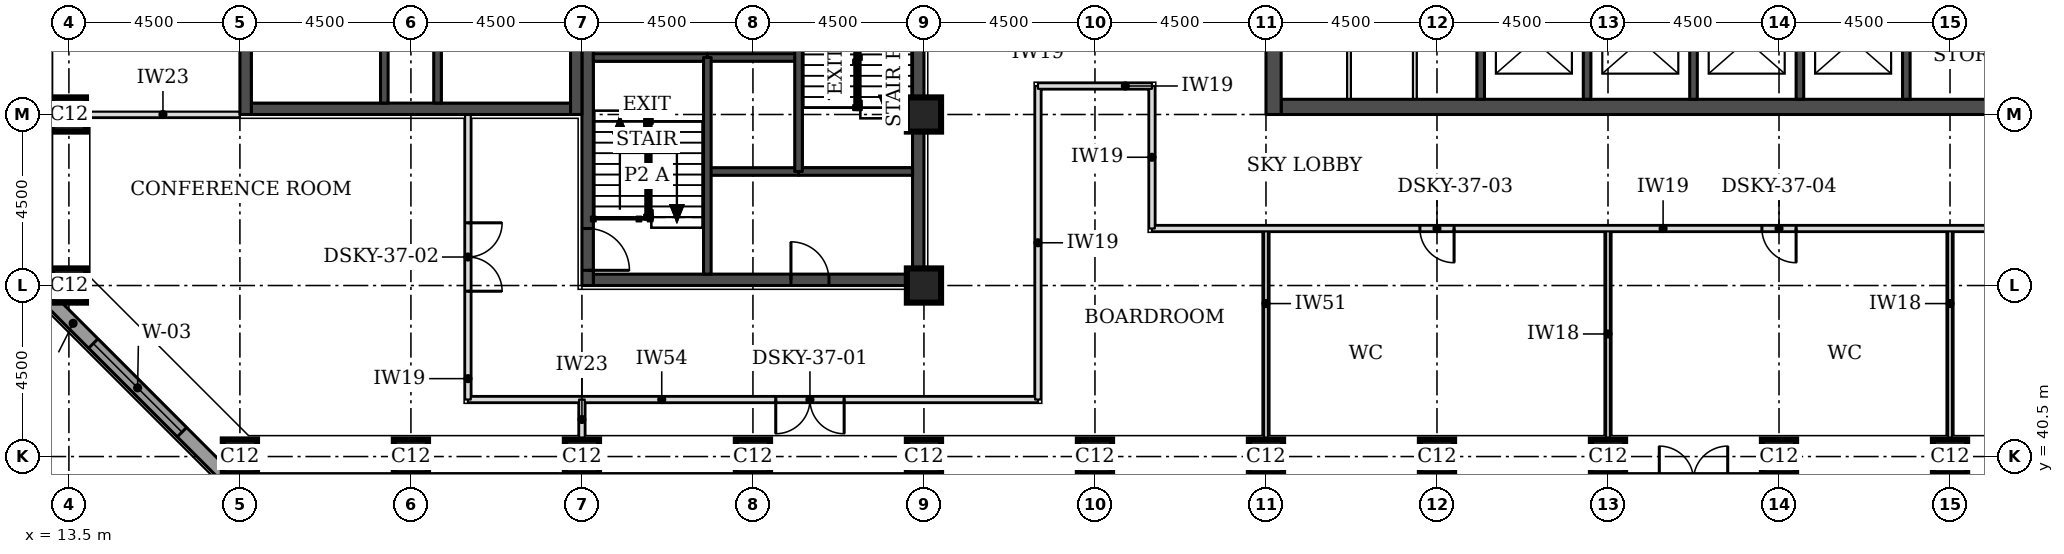
"""IFC4 building model, lengths in metres.
Left out: names, types, materials, properties, quantities, classifications, styles, units other than length and angle.
Written with IfcOpenShell. Run it as: python <this file> out.ifc"""

import sys

from ifc_helpers import new_model, si_unit, direction, frame, frame_2d, origin, origin_2d, place, context, subcontext, project, spatial, rectangle, extrude, element, fill, save


model = new_model("IFC4")
c1 = context("Model", 3, precision=1e-05, world=origin(), true_north=direction((0.0, 1.0)))
c2 = subcontext(c1, "Body", "Model", "MODEL_VIEW")
j1 = project(units=[si_unit("LENGTHUNIT", "METRE"), si_unit("PLANEANGLEUNIT", "RADIAN")], contexts=[c1])
p1 = place(None, origin())
s1 = spatial("IfcSite", under=j1, at=p1, CompositionType="ELEMENT")
p2 = place(p1, origin())
s2 = spatial("IfcBuilding", under=s1, at=p2, CompositionType="ELEMENT")
p3 = place(p2, frame((0.0, 0.0, 143.1)))
s3 = spatial("IfcBuildingStorey", under=s2, at=p3, CompositionType="ELEMENT", Elevation=143.1)
for number, where, z_axis, x_axis in (
    (1, (18.0, 40.5, 0.0), (0.0, 0.0, 1.0), (1.0, 0.0, 0.0)),
    (2, (22.5, 40.5, 0.0), (0.0, 0.0, 1.0), (1.0, 0.0, 0.0)),
    (3, (27.0, 40.5, 0.0), (0.0, 0.0, 1.0), (1.0, 0.0, 0.0)),
    (4, (31.5, 40.5, 0.0), (0.0, 0.0, 1.0), (1.0, 0.0, 0.0)),
    (5, (36.0, 40.5, 0.0), (0.0, 0.0, 1.0), (1.0, 0.0, 0.0)),
    (6, (40.5, 40.5, 0.0), (0.0, 0.0, 1.0), (1.0, 0.0, 0.0)),
    (7, (45.0, 40.5, 0.0), (0.0, 0.0, 1.0), (1.0, 0.0, 0.0)),
    (8, (49.5, 40.5, 0.0), (0.0, 0.0, 1.0), (1.0, 0.0, 0.0)),
    (9, (54.0, 40.5, 0.0), (0.0, 0.0, 1.0), (1.0, 0.0, 0.0)),
    (10, (58.5, 40.5, 0.0), (0.0, 0.0, 1.0), (1.0, 0.0, 0.0)),
    (11, (63.0, 40.5, 0.0), (0.0, 0.0, 1.0), (1.0, 0.0, 0.0)),
    (12, (13.5, 45.0, 0.0), (0.0, 0.0, 1.0), (1.0, 0.0, 0.0)),
    (13, (36.0, 45.0, 0.0), (0.0, 0.0, 1.0), (1.0, 0.0, 0.0)),
    (14, (13.5, 49.5, 0.0), (0.0, 0.0, 1.0), (1.0, 0.0, 0.0)),
    (15, (36.0, 49.5, 0.0), (0.0, 0.0, 1.0), (1.0, 0.0, 0.0)),
):
    element("IfcColumn", number, at=place(p3, frame(where, z_axis=z_axis, x_axis=x_axis)), inside=s3, PredefinedType="COLUMN", context=c2, shape_type="SweptSolid", body=[
        extrude(rectangle(XDim=0.9, YDim=0.9, at=origin_2d()), origin(), (0.0, 0.0, 1.0), 4.6),
    ])
p4 = place(p3, frame((45.4, 49.7, 0.0), z_axis=(0.0, 0.0, 1.0), x_axis=(1.0, 0.0, 0.0)))
e16 = element("IfcWall", 16, at=p4, inside=s3, PredefinedType="SHEAR", context=c2, shape_type="SweptSolid", body=[
    extrude(rectangle(XDim=21.7, YDim=0.4, at=frame_2d((10.85, 0.0))), origin(), (0.0, 0.0, 1.0), 4.6),
])
p5 = place(p3, frame((45.2, 49.5, 0.0), z_axis=(0.0, 0.0, 1.0), x_axis=(0.0, 1.0, 0.0)))
e17 = element("IfcWall", 17, at=p5, inside=s3, PredefinedType="SHEAR", context=c2, shape_type="SweptSolid", body=[
    extrude(rectangle(XDim=22.5, YDim=0.4, at=frame_2d((11.25, 0.0))), origin(), (0.0, 0.0, 1.0), 4.6),
])
p6 = place(p5, frame((4.2, 0.0, 0.0)))
e18 = element("IfcOpeningElement", 18, at=p6, cuts=e17, PredefinedType="OPENING", context=c2, shape_type="SweptSolid", body=[
    extrude(rectangle(XDim=1.8, YDim=2.1, at=frame_2d((0.9, 1.05))), frame((0.0, 0.21, 0.0), z_axis=(0.0, -1.0, 0.0), x_axis=(1.0, 0.0, 0.0)), (0.0, 0.0, 1.0), 0.42),
])
p7 = place(p5, frame((6.9, 0.0, 0.0)))
e19 = element("IfcOpeningElement", 19, at=p7, cuts=e17, PredefinedType="OPENING", context=c2, shape_type="SweptSolid", body=[
    extrude(rectangle(XDim=1.1, YDim=2.1, at=frame_2d((0.55, 1.05))), frame((0.0, 0.21, 0.0), z_axis=(0.0, -1.0, 0.0), x_axis=(1.0, 0.0, 0.0)), (0.0, 0.0, 1.0), 0.42),
])
p8 = place(p5, frame((13.6, 0.0, 0.0)))
e20 = element("IfcOpeningElement", 20, at=p8, cuts=e17, PredefinedType="OPENING", context=c2, shape_type="SweptSolid", body=[
    extrude(rectangle(XDim=1.1, YDim=2.1, at=frame_2d((0.55, 1.05))), frame((0.0, 0.21, 0.0), z_axis=(0.0, -1.0, 0.0), x_axis=(1.0, 0.0, 0.0)), (0.0, 0.0, 1.0), 0.42),
])
p9 = place(p5, frame((16.5, 0.0, 0.0)))
e21 = element("IfcOpeningElement", 21, at=p9, cuts=e17, PredefinedType="OPENING", context=c2, shape_type="SweptSolid", body=[
    extrude(rectangle(XDim=1.8, YDim=2.1, at=frame_2d((0.9, 1.05))), frame((0.0, 0.21, 0.0), z_axis=(0.0, -1.0, 0.0), x_axis=(1.0, 0.0, 0.0)), (0.0, 0.0, 1.0), 0.42),
])
p10 = place(p3, frame((27.3, 45.15, 0.0), z_axis=(0.0, 0.0, 1.0), x_axis=(1.0, 0.0, 0.0)))
e22 = element("IfcWall", 22, at=p10, inside=s3, PredefinedType="SHEAR", context=c2, shape_type="SweptSolid", body=[
    extrude(rectangle(XDim=8.4, YDim=0.3, at=frame_2d((4.2, 0.0))), origin(), (0.0, 0.0, 1.0), 4.6),
])
p11 = place(p10, frame((5.2, 0.0, 0.0)))
e23 = element("IfcOpeningElement", 23, at=p11, cuts=e22, PredefinedType="OPENING", context=c2, shape_type="SweptSolid", body=[
    extrude(rectangle(XDim=1.0, YDim=2.1, at=frame_2d((0.5, 1.05))), frame((0.0, 0.16, 0.0), z_axis=(0.0, -1.0, 0.0), x_axis=(1.0, 0.0, 0.0)), (0.0, 0.0, 1.0), 0.32),
])
p12 = place(p3, frame((27.15, 45.0, 0.0), z_axis=(0.0, 0.0, 1.0), x_axis=(0.0, 1.0, 0.0)))
e24 = element("IfcWall", 24, at=p12, inside=s3, PredefinedType="SHEAR", context=c2, shape_type="SweptSolid", body=[
    extrude(rectangle(XDim=9.0, YDim=0.3, at=frame_2d((4.5, 0.0))), origin(), (0.0, 0.0, 1.0), 4.6),
])
p13 = place(p12, frame((0.4, 0.0, 0.0)))
e25 = element("IfcOpeningElement", 25, at=p13, cuts=e24, PredefinedType="OPENING", context=c2, shape_type="SweptSolid", body=[
    extrude(rectangle(XDim=1.1, YDim=2.1, at=frame_2d((0.55, 1.05))), frame((0.0, 0.16, 0.0), z_axis=(0.0, -1.0, 0.0), x_axis=(1.0, 0.0, 0.0)), (0.0, 0.0, 1.0), 0.32),
])
p14 = place(p3, frame((35.85, 45.0, 0.0), z_axis=(0.0, 0.0, 1.0), x_axis=(0.0, 1.0, 0.0)))
e26 = element("IfcWall", 26, at=p14, inside=s3, PredefinedType="SHEAR", context=c2, shape_type="SweptSolid", body=[
    extrude(rectangle(XDim=9.0, YDim=0.3, at=frame_2d((4.5, 0.0))), origin(), (0.0, 0.0, 1.0), 4.6),
])
p15 = place(p3, frame((18.3, 49.65, 0.0), z_axis=(0.0, 0.0, 1.0), x_axis=(1.0, 0.0, 0.0)))
e27 = element("IfcWall", 27, at=p15, inside=s3, PredefinedType="SHEAR", context=c2, shape_type="SweptSolid", body=[
    extrude(rectangle(XDim=8.4, YDim=0.3, at=frame_2d((4.2, 0.0))), origin(), (0.0, 0.0, 1.0), 4.6),
])
p16 = place(p3, frame((18.15, 49.5, 0.0), z_axis=(0.0, 0.0, 1.0), x_axis=(0.0, 1.0, 0.0)))
e28 = element("IfcWall", 28, at=p16, inside=s3, PredefinedType="SHEAR", context=c2, shape_type="SweptSolid", body=[
    extrude(rectangle(XDim=9.0, YDim=0.3, at=frame_2d((4.5, 0.0))), origin(), (0.0, 0.0, 1.0), 4.6),
])
p17 = place(p3, frame((26.85, 49.5, 0.0), z_axis=(0.0, 0.0, 1.0), x_axis=(0.0, 1.0, 0.0)))
e29 = element("IfcWall", 29, at=p17, inside=s3, PredefinedType="SHEAR", context=c2, shape_type="SweptSolid", body=[
    extrude(rectangle(XDim=9.0, YDim=0.3, at=frame_2d((4.5, 0.0))), origin(), (0.0, 0.0, 1.0), 4.6),
])
p18 = place(p17, frame((6.6, 0.0, 0.0)))
e30 = element("IfcOpeningElement", 30, at=p18, cuts=e29, PredefinedType="OPENING", context=c2, shape_type="SweptSolid", body=[
    extrude(rectangle(XDim=1.8, YDim=2.1, at=frame_2d((0.9, 1.05))), frame((0.0, 0.16, 0.0), z_axis=(0.0, -1.0, 0.0), x_axis=(1.0, 0.0, 0.0)), (0.0, 0.0, 1.0), 0.32),
])
p19 = place(p3, frame((12.824, 44.792, 0.0), z_axis=(0.0, 0.0, 1.0), x_axis=(0.707106781187, -0.707106781187, 0.0)))
e31 = element("IfcWall", 31, at=p19, inside=s3, PredefinedType="STANDARD", context=c2, shape_type="SweptSolid", body=[
    extrude(rectangle(XDim=7.027, YDim=0.35, at=frame_2d((3.513, 0.0))), origin(), (0.0, 0.0, 1.0), 4.425),
])
p20 = place(p19, frame((1.863, 0.0, 0.9)))
e32 = element("IfcOpeningElement", 32, at=p20, cuts=e31, PredefinedType="OPENING", context=c2, shape_type="SweptSolid", body=[
    extrude(rectangle(XDim=3.3, YDim=2.7, at=frame_2d((1.65, 1.35))), frame((0.0, 0.185, 0.0), z_axis=(0.0, -1.0, 0.0), x_axis=(1.0, 0.0, 0.0)), (0.0, 0.0, 1.0), 0.37),
])
p21 = place(p3, frame((45.0, 40.95, 0.0), z_axis=(0.0, 0.0, 1.0), x_axis=(0.0, 1.0, 0.0)))
e33 = element("IfcWall", 33, at=p21, inside=s3, PredefinedType="PARTITIONING", context=c2, shape_type="SweptSolid", body=[
    extrude(rectangle(XDim=5.55, YDim=0.1, at=frame_2d((2.775, 0.0))), origin(), (0.0, 0.0, 1.0), 3.922),
])
for number, where, z_axis, x_axis in (
    (34, (54.0, 40.95, 0.0), (0.0, 0.0, 1.0), (0.0, 1.0, 0.0)),
    (35, (63.0, 40.95, 0.0), (0.0, 0.0, 1.0), (0.0, 1.0, 0.0)),
):
    element("IfcWall", number, at=place(p3, frame(where, z_axis=z_axis, x_axis=x_axis)), inside=s3, PredefinedType="PARTITIONING", context=c2, shape_type="SweptSolid", body=[
        extrude(rectangle(XDim=5.55, YDim=0.1, at=frame_2d((2.775, 0.0))), origin(), (0.0, 0.0, 1.0), 4.45),
    ])
p22 = place(p3, frame((24.0, 42.0, 0.0), z_axis=(0.0, 0.0, 1.0), x_axis=(1.0, 0.0, 0.0)))
e36 = element("IfcWall", 36, at=p22, inside=s3, PredefinedType="PARTITIONING", context=c2, shape_type="SweptSolid", body=[
    extrude(rectangle(XDim=15.0, YDim=0.15, at=frame_2d((7.5, 0.0))), origin(), (0.0, 0.0, 1.0), 3.996),
])
p23 = place(p22, frame((8.1, 0.0, 0.0)))
e37 = element("IfcOpeningElement", 37, at=p23, cuts=e36, PredefinedType="OPENING", context=c2, shape_type="SweptSolid", body=[
    extrude(rectangle(XDim=1.8, YDim=2.1, at=frame_2d((0.9, 1.05))), frame((0.0, 0.085, 0.0), z_axis=(0.0, -1.0, 0.0), x_axis=(1.0, 0.0, 0.0)), (0.0, 0.0, 1.0), 0.17),
])
p24 = place(p3, frame((24.0, 42.0, 0.0), z_axis=(0.0, 0.0, 1.0), x_axis=(0.0, 1.0, 0.0)))
e38 = element("IfcWall", 38, at=p24, inside=s3, PredefinedType="PARTITIONING", context=c2, shape_type="SweptSolid", body=[
    extrude(rectangle(XDim=7.5, YDim=0.15, at=frame_2d((3.75, 0.0))), origin(), (0.0, 0.0, 1.0), 4.45),
])
p25 = place(p24, frame((2.85, 0.0, 0.0)))
e39 = element("IfcOpeningElement", 39, at=p25, cuts=e38, PredefinedType="OPENING", context=c2, shape_type="SweptSolid", body=[
    extrude(rectangle(XDim=1.8, YDim=2.1, at=frame_2d((0.9, 1.05))), frame((0.0, 0.085, 0.0), z_axis=(0.0, -1.0, 0.0), x_axis=(1.0, 0.0, 0.0)), (0.0, 0.0, 1.0), 0.17),
])
p26 = place(p3, frame((39.0, 42.0, 0.0), z_axis=(0.0, 0.0, 1.0), x_axis=(0.0, 1.0, 0.0)))
e40 = element("IfcWall", 40, at=p26, inside=s3, PredefinedType="PARTITIONING", context=c2, shape_type="SweptSolid", body=[
    extrude(rectangle(XDim=8.25, YDim=0.15, at=frame_2d((4.125, 0.0))), origin(), (0.0, 0.0, 1.0), 4.45),
])
p27 = place(p3, frame((42.0, 46.5, 0.0), z_axis=(0.0, 0.0, 1.0), x_axis=(1.0, 0.0, 0.0)))
e41 = element("IfcWall", 41, at=p27, inside=s3, PredefinedType="PARTITIONING", context=c2, shape_type="SweptSolid", body=[
    extrude(rectangle(XDim=28.5, YDim=0.15, at=frame_2d((14.25, 0.0))), origin(), (0.0, 0.0, 1.0), 4.45),
])
p28 = place(p27, frame((7.05, 0.0, 0.0)))
e42 = element("IfcOpeningElement", 42, at=p28, cuts=e41, PredefinedType="OPENING", context=c2, shape_type="SweptSolid", body=[
    extrude(rectangle(XDim=0.9, YDim=2.1, at=frame_2d((0.45, 1.05))), frame((0.0, 0.085, 0.0), z_axis=(0.0, -1.0, 0.0), x_axis=(1.0, 0.0, 0.0)), (0.0, 0.0, 1.0), 0.17),
])
p29 = place(p27, frame((16.05, 0.0, 0.0)))
e43 = element("IfcOpeningElement", 43, at=p29, cuts=e41, PredefinedType="OPENING", context=c2, shape_type="SweptSolid", body=[
    extrude(rectangle(XDim=0.9, YDim=2.1, at=frame_2d((0.45, 1.05))), frame((0.0, 0.085, 0.0), z_axis=(0.0, -1.0, 0.0), x_axis=(1.0, 0.0, 0.0)), (0.0, 0.0, 1.0), 0.17),
])
p30 = place(p27, frame((23.85, 0.0, 0.0)))
e44 = element("IfcOpeningElement", 44, at=p30, cuts=e41, PredefinedType="OPENING", context=c2, shape_type="SweptSolid", body=[
    extrude(rectangle(XDim=1.8, YDim=2.1, at=frame_2d((0.9, 1.05))), frame((0.0, 0.085, 0.0), z_axis=(0.0, -1.0, 0.0), x_axis=(1.0, 0.0, 0.0)), (0.0, 0.0, 1.0), 0.17),
])
p31 = place(p3, frame((42.0, 46.5, 0.0), z_axis=(0.0, 0.0, 1.0), x_axis=(0.0, 1.0, 0.0)))
e45 = element("IfcWall", 45, at=p31, inside=s3, PredefinedType="PARTITIONING", context=c2, shape_type="SweptSolid", body=[
    extrude(rectangle(XDim=3.75, YDim=0.15, at=frame_2d((1.875, 0.0))), origin(), (0.0, 0.0, 1.0), 4.45),
])
p32 = place(p3, frame((39.0, 50.25, 0.0), z_axis=(0.0, 0.0, 1.0), x_axis=(1.0, 0.0, 0.0)))
e46 = element("IfcWall", 46, at=p32, inside=s3, PredefinedType="PARTITIONING", context=c2, shape_type="SweptSolid", body=[
    extrude(rectangle(XDim=3.0, YDim=0.15, at=frame_2d((1.5, 0.0))), origin(), (0.0, 0.0, 1.0), 4.45),
])
p33 = place(p3, frame((27.0, 40.95, 0.0), z_axis=(0.0, 0.0, 1.0), x_axis=(0.0, 1.0, 0.0)))
e47 = element("IfcWall", 47, at=p33, inside=s3, PredefinedType="PARTITIONING", context=c2, shape_type="SweptSolid", body=[
    extrude(rectangle(XDim=1.05, YDim=0.15, at=frame_2d((0.525, 0.0))), origin(), (0.0, 0.0, 1.0), 4.45),
])
p34 = place(p3, frame((13.95, 49.5, 0.0), z_axis=(0.0, 0.0, 1.0), x_axis=(1.0, 0.0, 0.0)))
e48 = element("IfcWall", 48, at=p34, inside=s3, PredefinedType="PARTITIONING", context=c2, shape_type="SweptSolid", body=[
    extrude(rectangle(XDim=4.05, YDim=0.15, at=frame_2d((2.025, 0.0))), origin(), (0.0, 0.0, 1.0), 4.45),
])
for number, where, z_axis, x_axis in (
    (49, (47.185, 49.9, 0.0), (0.0, 0.0, 1.0), (0.0, 1.0, 0.0)),
    (50, (48.917, 49.9, 0.0), (0.0, 0.0, 1.0), (0.0, 1.0, 0.0)),
):
    element("IfcWall", number, at=place(p3, frame(where, z_axis=z_axis, x_axis=x_axis)), inside=s3, PredefinedType="PARTITIONING", context=c2, shape_type="SweptSolid", body=[
        extrude(rectangle(XDim=3.1, YDim=0.1, at=frame_2d((1.55, 0.0))), origin(), (0.0, 0.0, 1.0), 4.45),
    ])
for number, where, z_axis, x_axis in (
    (51, (50.65, 49.9, 0.0), (0.0, 0.0, 1.0), (0.0, 1.0, 0.0)),
    (52, (53.45, 49.9, 0.0), (0.0, 0.0, 1.0), (0.0, 1.0, 0.0)),
    (53, (56.25, 49.9, 0.0), (0.0, 0.0, 1.0), (0.0, 1.0, 0.0)),
    (54, (59.05, 49.9, 0.0), (0.0, 0.0, 1.0), (0.0, 1.0, 0.0)),
    (55, (61.85, 49.9, 0.0), (0.0, 0.0, 1.0), (0.0, 1.0, 0.0)),
):
    element("IfcWall", number, at=place(p3, frame(where, z_axis=z_axis, x_axis=x_axis)), inside=s3, PredefinedType="SOLIDWALL", context=c2, shape_type="SweptSolid", body=[
        extrude(rectangle(XDim=3.1, YDim=0.2, at=frame_2d((1.55, 0.0))), origin(), (0.0, 0.0, 1.0), 4.45),
    ])
p35 = place(p3, frame((30.3, 48.0, 0.0), z_axis=(0.0, 0.0, 1.0), x_axis=(1.0, 0.0, 0.0)))
e56 = element("IfcWall", 56, at=p35, inside=s3, PredefinedType="SOLIDWALL", context=c2, shape_type="SweptSolid", body=[
    extrude(rectangle(XDim=2.4, YDim=0.2, at=frame_2d((1.2, 0.0))), origin(), (0.0, 0.0, 1.0), 4.45),
])
p36 = place(p3, frame((32.7, 48.0, 0.0), z_axis=(0.0, 0.0, 1.0), x_axis=(1.0, 0.0, 0.0)))
e57 = element("IfcWall", 57, at=p36, inside=s3, PredefinedType="SOLIDWALL", context=c2, shape_type="SweptSolid", body=[
    extrude(rectangle(XDim=3.0, YDim=0.2, at=frame_2d((1.5, 0.0))), origin(), (0.0, 0.0, 1.0), 4.45),
])
p37 = place(p3, frame((30.3, 51.0, 0.0), z_axis=(0.0, 0.0, 1.0), x_axis=(1.0, 0.0, 0.0)))
e58 = element("IfcWall", 58, at=p37, inside=s3, PredefinedType="SOLIDWALL", context=c2, shape_type="SweptSolid", body=[
    extrude(rectangle(XDim=2.4, YDim=0.2, at=frame_2d((1.2, 0.0))), origin(), (0.0, 0.0, 1.0), 4.6),
])
p38 = place(p3, frame((27.3, 51.0, 0.0), z_axis=(0.0, 0.0, 1.0), x_axis=(1.0, 0.0, 0.0)))
e59 = element("IfcWall", 59, at=p38, inside=s3, PredefinedType="SOLIDWALL", context=c2, shape_type="SweptSolid", body=[
    extrude(rectangle(XDim=3.0, YDim=0.2, at=frame_2d((1.5, 0.0))), origin(), (0.0, 0.0, 1.0), 4.45),
])
for number, where, z_axis, x_axis in (
    (60, (30.3, 45.3, 0.0), (0.0, 0.0, 1.0), (0.0, 1.0, 0.0)),
    (61, (32.7, 48.0, 0.0), (0.0, 0.0, 1.0), (0.0, 1.0, 0.0)),
):
    element("IfcWall", number, at=place(p3, frame(where, z_axis=z_axis, x_axis=x_axis)), inside=s3, PredefinedType="SOLIDWALL", context=c2, shape_type="SweptSolid", body=[
        extrude(rectangle(XDim=5.7, YDim=0.2, at=frame_2d((2.85, 0.0))), origin(), (0.0, 0.0, 1.0), 4.45),
    ])
for number, where, z_axis, x_axis in (
    (62, (21.8, 49.8, 0.0), (0.0, 0.0, 1.0), (0.0, 1.0, 0.0)),
    (63, (23.2, 49.8, 0.0), (0.0, 0.0, 1.0), (0.0, 1.0, 0.0)),
):
    element("IfcWall", number, at=place(p3, frame(where, z_axis=z_axis, x_axis=x_axis)), inside=s3, PredefinedType="SOLIDWALL", context=c2, shape_type="SweptSolid", body=[
        extrude(rectangle(XDim=6.05, YDim=0.2, at=frame_2d((3.025, 0.0))), origin(), (0.0, 0.0, 1.0), 4.45),
    ])
p39 = place(p20, origin())
e64 = element("IfcWindow", 64, at=p39, inside=s3, PartitioningType="SINGLE_PANEL", PredefinedType="WINDOW", context=c2, shape_type="SweptSolid", body=[
    extrude(rectangle(XDim=3.3, YDim=2.7, at=frame_2d((1.65, 1.35))), frame((0.0, 0.085, 0.0), z_axis=(0.0, -1.0, 0.0), x_axis=(1.0, 0.0, 0.0)), (0.0, 0.0, 1.0), 0.06),
])
fill(e32, e64)
p40 = place(p28, frame((0.9, 0.0, 0.0), z_axis=(0.0, 0.0, 1.0), x_axis=(-1.0, 0.0, 0.0)))
e65 = element("IfcDoor", 65, at=p40, inside=s3, OperationType="SINGLE_SWING_LEFT", PredefinedType="DOOR", context=c2, shape_type="SweptSolid", body=[
    extrude(rectangle(XDim=0.9, YDim=2.1, at=frame_2d((0.45, 1.05))), frame((0.0, 0.025, 0.0), z_axis=(0.0, -1.0, 0.0), x_axis=(1.0, 0.0, 0.0)), (0.0, 0.0, 1.0), 0.05),
])
fill(e42, e65)
p41 = place(p29, frame((0.9, 0.0, 0.0), z_axis=(0.0, 0.0, 1.0), x_axis=(-1.0, 0.0, 0.0)))
e66 = element("IfcDoor", 66, at=p41, inside=s3, OperationType="SINGLE_SWING_LEFT", PredefinedType="DOOR", context=c2, shape_type="SweptSolid", body=[
    extrude(rectangle(XDim=0.9, YDim=2.1, at=frame_2d((0.45, 1.05))), frame((0.0, 0.025, 0.0), z_axis=(0.0, -1.0, 0.0), x_axis=(1.0, 0.0, 0.0)), (0.0, 0.0, 1.0), 0.05),
])
fill(e43, e66)
p42 = place(p23, frame((1.8, 0.0, 0.0), z_axis=(0.0, 0.0, 1.0), x_axis=(-1.0, 0.0, 0.0)))
e67 = element("IfcDoor", 67, at=p42, inside=s3, OperationType="DOUBLE_DOOR_SINGLE_SWING", PredefinedType="DOOR", context=c2, shape_type="SweptSolid", body=[
    extrude(rectangle(XDim=1.8, YDim=2.1, at=frame_2d((0.9, 1.05))), frame((0.0, 0.025, 0.0), z_axis=(0.0, -1.0, 0.0), x_axis=(1.0, 0.0, 0.0)), (0.0, 0.0, 1.0), 0.05),
])
fill(e37, e67)
p43 = place(p25, frame((1.8, 0.0, 0.0), z_axis=(0.0, 0.0, 1.0), x_axis=(-1.0, 0.0, 0.0)))
e68 = element("IfcDoor", 68, at=p43, inside=s3, OperationType="DOUBLE_DOOR_SINGLE_SWING", PredefinedType="DOOR", context=c2, shape_type="SweptSolid", body=[
    extrude(rectangle(XDim=1.8, YDim=2.1, at=frame_2d((0.9, 1.05))), frame((0.0, 0.025, 0.0), z_axis=(0.0, -1.0, 0.0), x_axis=(1.0, 0.0, 0.0)), (0.0, 0.0, 1.0), 0.05),
])
fill(e39, e68)
p44 = place(p13, frame((1.1, 0.0, 0.0), z_axis=(0.0, 0.0, 1.0), x_axis=(-1.0, 0.0, 0.0)))
e69 = element("IfcDoor", 69, at=p44, inside=s3, OperationType="SINGLE_SWING_RIGHT", PredefinedType="DOOR", context=c2, shape_type="SweptSolid", body=[
    extrude(rectangle(XDim=1.1, YDim=2.1, at=frame_2d((0.55, 1.05))), frame((0.0, 0.025, 0.0), z_axis=(0.0, -1.0, 0.0), x_axis=(1.0, 0.0, 0.0)), (0.0, 0.0, 1.0), 0.05),
])
fill(e25, e69)
p45 = place(p11, origin())
e70 = element("IfcDoor", 70, at=p45, inside=s3, OperationType="SINGLE_SWING_LEFT", PredefinedType="DOOR", context=c2, shape_type="SweptSolid", body=[
    extrude(rectangle(XDim=1.0, YDim=2.1, at=frame_2d((0.5, 1.05))), frame((0.0, 0.025, 0.0), z_axis=(0.0, -1.0, 0.0), x_axis=(1.0, 0.0, 0.0)), (0.0, 0.0, 1.0), 0.05),
])
fill(e23, e70)
save(model, sys.argv[1])
